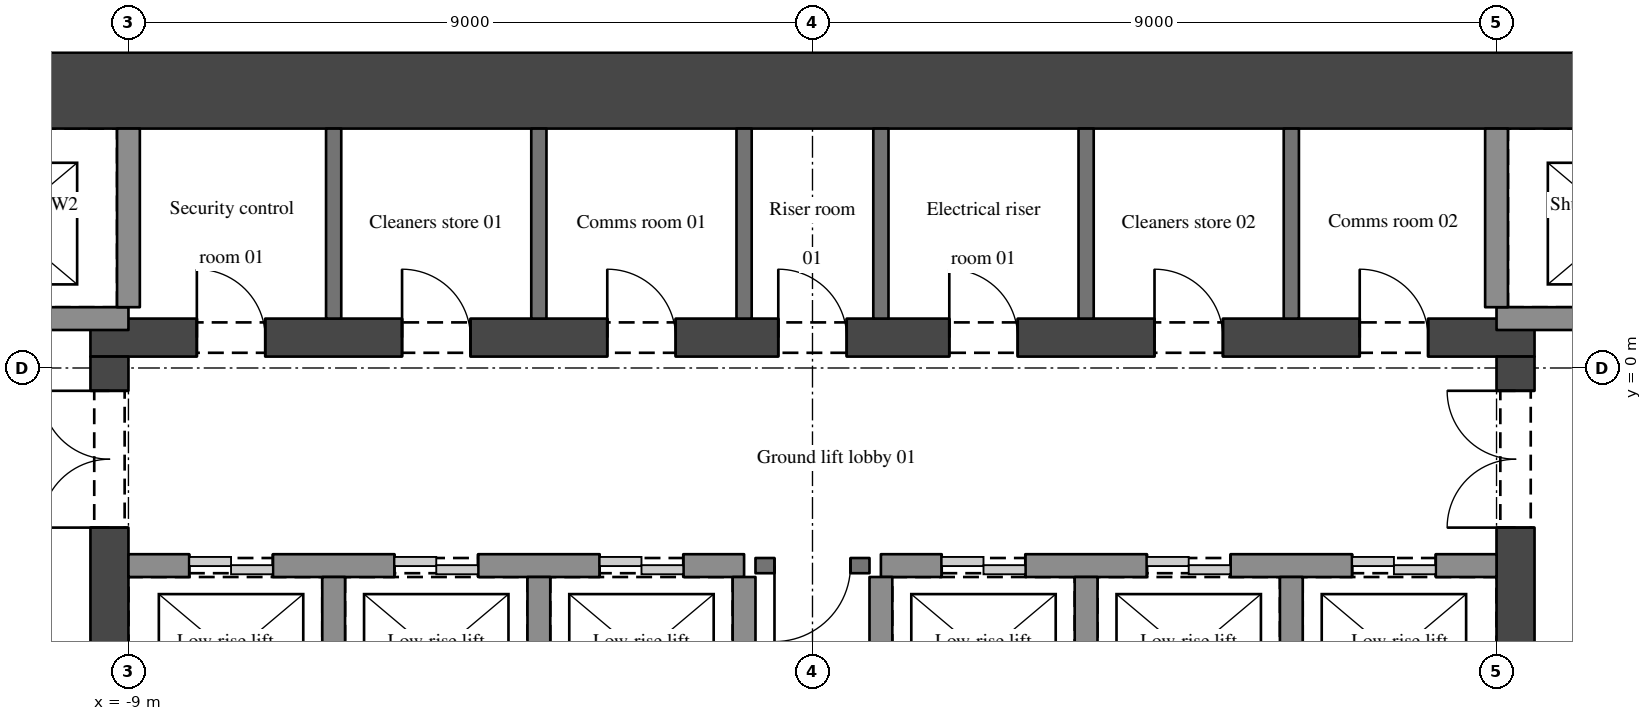
"""IFC4 building model, lengths in metres.
Left out: names, types, materials, properties, quantities, classifications, styles, units other than length and angle.
Written with IfcOpenShell. Run it as: python <this file> out.ifc"""

import sys

from ifc_helpers import new_model, si_unit, direction, frame, frame_2d, origin, place, context, subcontext, project, spatial, rectangle, extrude, element, fill, save


model = new_model("IFC4")
c1 = context("Model", 3, precision=1e-05, world=origin(), true_north=direction((0.0, 1.0)))
c2 = subcontext(c1, "Body", "Model", "MODEL_VIEW")
j1 = project(units=[si_unit("LENGTHUNIT", "METRE"), si_unit("PLANEANGLEUNIT", "RADIAN")], contexts=[c1])
p1 = place(None, origin())
s1 = spatial("IfcSite", under=j1, at=p1, CompositionType="ELEMENT")
p2 = place(p1, origin())
s2 = spatial("IfcBuilding", under=s1, at=p2, CompositionType="ELEMENT")
p3 = place(p2, origin())
s3 = spatial("IfcBuildingStorey", under=s2, at=p3, CompositionType="ELEMENT", Elevation=0.0)
p4 = place(p3, frame((-15.0, 3.65, 0.0), z_axis=(0.0, 0.0, 1.0), x_axis=(1.0, 0.0, 0.0)))
e1 = element("IfcWall", 1, at=p4, inside=s3, PredefinedType="SHEAR", context=c2, shape_type="SweptSolid", body=[
    extrude(rectangle(XDim=30.0, YDim=1.0, at=frame_2d((15.0, 0.0))), origin(), (0.0, 0.0, 1.0), 10.8),
])
p5 = place(p3, frame((-9.5, 0.4, 0.0), z_axis=(0.0, 0.0, 1.0), x_axis=(1.0, 0.0, 0.0)))
e2 = element("IfcWall", 2, at=p5, inside=s3, PredefinedType="SHEAR", context=c2, shape_type="SweptSolid", body=[
    extrude(rectangle(XDim=19.0, YDim=0.5, at=frame_2d((9.5, 0.0))), origin(), (0.0, 0.0, 1.0), 10.8),
])
p6 = place(p5, frame((1.4, 0.0, 0.0)))
e3 = element("IfcOpeningElement", 3, at=p6, cuts=e2, PredefinedType="OPENING", context=c2, shape_type="SweptSolid", body=[
    extrude(rectangle(XDim=0.9, YDim=2.1, at=frame_2d((0.45, 1.05))), frame((0.0, 0.26, 0.0), z_axis=(0.0, -1.0, 0.0), x_axis=(1.0, 0.0, 0.0)), (0.0, 0.0, 1.0), 0.52),
])
p7 = place(p5, frame((4.1, 0.0, 0.0)))
e4 = element("IfcOpeningElement", 4, at=p7, cuts=e2, PredefinedType="OPENING", context=c2, shape_type="SweptSolid", body=[
    extrude(rectangle(XDim=0.9, YDim=2.1, at=frame_2d((0.45, 1.05))), frame((0.0, 0.26, 0.0), z_axis=(0.0, -1.0, 0.0), x_axis=(1.0, 0.0, 0.0)), (0.0, 0.0, 1.0), 0.52),
])
p8 = place(p5, frame((6.8, 0.0, 0.0)))
e5 = element("IfcOpeningElement", 5, at=p8, cuts=e2, PredefinedType="OPENING", context=c2, shape_type="SweptSolid", body=[
    extrude(rectangle(XDim=0.9, YDim=2.1, at=frame_2d((0.45, 1.05))), frame((0.0, 0.26, 0.0), z_axis=(0.0, -1.0, 0.0), x_axis=(1.0, 0.0, 0.0)), (0.0, 0.0, 1.0), 0.52),
])
p9 = place(p5, frame((11.3, 0.0, 0.0)))
e6 = element("IfcOpeningElement", 6, at=p9, cuts=e2, PredefinedType="OPENING", context=c2, shape_type="SweptSolid", body=[
    extrude(rectangle(XDim=0.9, YDim=2.1, at=frame_2d((0.45, 1.05))), frame((0.0, 0.26, 0.0), z_axis=(0.0, -1.0, 0.0), x_axis=(1.0, 0.0, 0.0)), (0.0, 0.0, 1.0), 0.52),
])
p10 = place(p5, frame((14.0, 0.0, 0.0)))
e7 = element("IfcOpeningElement", 7, at=p10, cuts=e2, PredefinedType="OPENING", context=c2, shape_type="SweptSolid", body=[
    extrude(rectangle(XDim=0.9, YDim=2.1, at=frame_2d((0.45, 1.05))), frame((0.0, 0.26, 0.0), z_axis=(0.0, -1.0, 0.0), x_axis=(1.0, 0.0, 0.0)), (0.0, 0.0, 1.0), 0.52),
])
p11 = place(p5, frame((16.7, 0.0, 0.0)))
e8 = element("IfcOpeningElement", 8, at=p11, cuts=e2, PredefinedType="OPENING", context=c2, shape_type="SweptSolid", body=[
    extrude(rectangle(XDim=0.9, YDim=2.1, at=frame_2d((0.45, 1.05))), frame((0.0, 0.26, 0.0), z_axis=(0.0, -1.0, 0.0), x_axis=(1.0, 0.0, 0.0)), (0.0, 0.0, 1.0), 0.52),
])
p12 = place(p5, frame((9.05, 0.0, 0.0)))
e9 = element("IfcOpeningElement", 9, at=p12, cuts=e2, PredefinedType="OPENING", context=c2, shape_type="SweptSolid", body=[
    extrude(rectangle(XDim=0.9, YDim=2.1, at=frame_2d((0.45, 1.05))), frame((0.0, 0.26, 0.0), z_axis=(0.0, -1.0, 0.0), x_axis=(1.0, 0.0, 0.0)), (0.0, 0.0, 1.0), 0.52),
])
p13 = place(p3, frame((-9.25, -11.5, 0.0), z_axis=(0.0, 0.0, 1.0), x_axis=(0.0, 1.0, 0.0)))
e10 = element("IfcWall", 10, at=p13, inside=s3, PredefinedType="SHEAR", context=c2, shape_type="SweptSolid", body=[
    extrude(rectangle(XDim=11.65, YDim=0.5, at=frame_2d((5.825, 0.0))), origin(), (0.0, 0.0, 1.0), 10.8),
])
p14 = place(p13, frame((9.4, 0.0, 0.0)))
e11 = element("IfcOpeningElement", 11, at=p14, cuts=e10, PredefinedType="OPENING", context=c2, shape_type="SweptSolid", body=[
    extrude(rectangle(XDim=1.8, YDim=2.1, at=frame_2d((0.9, 1.05))), frame((0.0, 0.26, 0.0), z_axis=(0.0, -1.0, 0.0), x_axis=(1.0, 0.0, 0.0)), (0.0, 0.0, 1.0), 0.52),
])
p15 = place(p13, frame((5.25, 0.0, 0.0)))
e12 = element("IfcOpeningElement", 12, at=p15, cuts=e10, PredefinedType="OPENING", context=c2, shape_type="SweptSolid", body=[
    extrude(rectangle(XDim=1.1, YDim=2.1, at=frame_2d((0.55, 1.05))), frame((0.0, 0.26, 0.0), z_axis=(0.0, -1.0, 0.0), x_axis=(1.0, 0.0, 0.0)), (0.0, 0.0, 1.0), 0.52),
])
p16 = place(p3, frame((9.25, -11.5, 0.0), z_axis=(0.0, 0.0, 1.0), x_axis=(0.0, 1.0, 0.0)))
e13 = element("IfcWall", 13, at=p16, inside=s3, PredefinedType="SHEAR", context=c2, shape_type="SweptSolid", body=[
    extrude(rectangle(XDim=11.65, YDim=0.5, at=frame_2d((5.825, 0.0))), origin(), (0.0, 0.0, 1.0), 10.8),
])
p17 = place(p16, frame((9.4, 0.0, 0.0)))
e14 = element("IfcOpeningElement", 14, at=p17, cuts=e13, PredefinedType="OPENING", context=c2, shape_type="SweptSolid", body=[
    extrude(rectangle(XDim=1.8, YDim=2.1, at=frame_2d((0.9, 1.05))), frame((0.0, 0.26, 0.0), z_axis=(0.0, -1.0, 0.0), x_axis=(1.0, 0.0, 0.0)), (0.0, 0.0, 1.0), 0.52),
])
p18 = place(p16, frame((5.25, 0.0, 0.0)))
e15 = element("IfcOpeningElement", 15, at=p18, cuts=e13, PredefinedType="OPENING", context=c2, shape_type="SweptSolid", body=[
    extrude(rectangle(XDim=1.1, YDim=2.1, at=frame_2d((0.55, 1.05))), frame((0.0, 0.26, 0.0), z_axis=(0.0, -1.0, 0.0), x_axis=(1.0, 0.0, 0.0)), (0.0, 0.0, 1.0), 0.52),
])
p19 = place(p3, frame((-9.0, -2.6, 0.0), z_axis=(0.0, 0.0, 1.0), x_axis=(1.0, 0.0, 0.0)))
e16 = element("IfcWall", 16, at=p19, inside=s3, PredefinedType="SHEAR", context=c2, shape_type="SweptSolid", body=[
    extrude(rectangle(XDim=8.1, YDim=0.3, at=frame_2d((4.05, 0.0))), origin(), (0.0, 0.0, 1.0), 10.8),
])
p20 = place(p19, frame((0.8, 0.0, 0.0)))
e17 = element("IfcOpeningElement", 17, at=p20, cuts=e16, PredefinedType="OPENING", context=c2, shape_type="SweptSolid", body=[
    extrude(rectangle(XDim=1.1, YDim=2.1, at=frame_2d((0.55, 1.05))), frame((0.0, 0.16, 0.0), z_axis=(0.0, -1.0, 0.0), x_axis=(1.0, 0.0, 0.0)), (0.0, 0.0, 1.0), 0.32),
])
p21 = place(p19, frame((3.5, 0.0, 0.0)))
e18 = element("IfcOpeningElement", 18, at=p21, cuts=e16, PredefinedType="OPENING", context=c2, shape_type="SweptSolid", body=[
    extrude(rectangle(XDim=1.1, YDim=2.1, at=frame_2d((0.55, 1.05))), frame((0.0, 0.16, 0.0), z_axis=(0.0, -1.0, 0.0), x_axis=(1.0, 0.0, 0.0)), (0.0, 0.0, 1.0), 0.32),
])
p22 = place(p19, frame((6.2, 0.0, 0.0)))
e19 = element("IfcOpeningElement", 19, at=p22, cuts=e16, PredefinedType="OPENING", context=c2, shape_type="SweptSolid", body=[
    extrude(rectangle(XDim=1.1, YDim=2.1, at=frame_2d((0.55, 1.05))), frame((0.0, 0.16, 0.0), z_axis=(0.0, -1.0, 0.0), x_axis=(1.0, 0.0, 0.0)), (0.0, 0.0, 1.0), 0.32),
])
p23 = place(p3, frame((0.75, -2.6, 0.0), z_axis=(0.0, 0.0, 1.0), x_axis=(-1.0, 0.0, 0.0)))
e20 = element("IfcWall", 20, at=p23, inside=s3, PredefinedType="SOLIDWALL", context=c2, shape_type="SweptSolid", body=[
    extrude(rectangle(XDim=1.5, YDim=0.2, at=frame_2d((0.75, 0.0))), origin(), (0.0, 0.0, 1.0), 10.5),
])
p24 = place(p23, frame((0.25, 0.0, 0.0)))
e21 = element("IfcOpeningElement", 21, at=p24, cuts=e20, PredefinedType="OPENING", context=c2, shape_type="SweptSolid", body=[
    extrude(rectangle(XDim=1.0, YDim=2.1, at=frame_2d((0.5, 1.05))), frame((0.0, 0.11, 0.0), z_axis=(0.0, -1.0, 0.0), x_axis=(1.0, 0.0, 0.0)), (0.0, 0.0, 1.0), 0.22),
])
p25 = place(p3, frame((0.9, -2.6, 0.0), z_axis=(0.0, 0.0, 1.0), x_axis=(1.0, 0.0, 0.0)))
e22 = element("IfcWall", 22, at=p25, inside=s3, PredefinedType="SHEAR", context=c2, shape_type="SweptSolid", body=[
    extrude(rectangle(XDim=8.1, YDim=0.3, at=frame_2d((4.05, 0.0))), origin(), (0.0, 0.0, 1.0), 10.8),
])
p26 = place(p25, frame((0.8, 0.0, 0.0)))
e23 = element("IfcOpeningElement", 23, at=p26, cuts=e22, PredefinedType="OPENING", context=c2, shape_type="SweptSolid", body=[
    extrude(rectangle(XDim=1.1, YDim=2.1, at=frame_2d((0.55, 1.05))), frame((0.0, 0.16, 0.0), z_axis=(0.0, -1.0, 0.0), x_axis=(1.0, 0.0, 0.0)), (0.0, 0.0, 1.0), 0.32),
])
p27 = place(p25, frame((3.5, 0.0, 0.0)))
e24 = element("IfcOpeningElement", 24, at=p27, cuts=e22, PredefinedType="OPENING", context=c2, shape_type="SweptSolid", body=[
    extrude(rectangle(XDim=1.1, YDim=2.1, at=frame_2d((0.55, 1.05))), frame((0.0, 0.16, 0.0), z_axis=(0.0, -1.0, 0.0), x_axis=(1.0, 0.0, 0.0)), (0.0, 0.0, 1.0), 0.32),
])
p28 = place(p25, frame((6.2, 0.0, 0.0)))
e25 = element("IfcOpeningElement", 25, at=p28, cuts=e22, PredefinedType="OPENING", context=c2, shape_type="SweptSolid", body=[
    extrude(rectangle(XDim=1.1, YDim=2.1, at=frame_2d((0.55, 1.05))), frame((0.0, 0.16, 0.0), z_axis=(0.0, -1.0, 0.0), x_axis=(1.0, 0.0, 0.0)), (0.0, 0.0, 1.0), 0.32),
])
p29 = place(p3, frame((-9.0, 0.65, 0.0), z_axis=(0.0, 0.0, 1.0), x_axis=(-1.0, 0.0, 0.0)))
e26 = element("IfcWall", 26, at=p29, inside=s3, PredefinedType="SHEAR", context=c2, shape_type="SweptSolid", body=[
    extrude(rectangle(XDim=3.25, YDim=0.3, at=frame_2d((1.625, 0.0))), origin(), (0.0, 0.0, 1.0), 10.8),
])
p30 = place(p29, frame((1.05, 0.0, 0.0)))
e27 = element("IfcOpeningElement", 27, at=p30, cuts=e26, PredefinedType="OPENING", context=c2, shape_type="SweptSolid", body=[
    extrude(rectangle(XDim=1.1, YDim=2.1, at=frame_2d((0.55, 1.05))), frame((0.0, 0.16, 0.0), z_axis=(0.0, -1.0, 0.0), x_axis=(1.0, 0.0, 0.0)), (0.0, 0.0, 1.0), 0.32),
])
p31 = place(p3, frame((12.25, 0.65, 0.0), z_axis=(0.0, 0.0, 1.0), x_axis=(-1.0, 0.0, 0.0)))
e28 = element("IfcWall", 28, at=p31, inside=s3, PredefinedType="SHEAR", context=c2, shape_type="SweptSolid", body=[
    extrude(rectangle(XDim=3.25, YDim=0.3, at=frame_2d((1.625, 0.0))), origin(), (0.0, 0.0, 1.0), 10.8),
])
p32 = place(p31, frame((1.1, 0.0, 0.0)))
e29 = element("IfcOpeningElement", 29, at=p32, cuts=e28, PredefinedType="OPENING", context=c2, shape_type="SweptSolid", body=[
    extrude(rectangle(XDim=1.1, YDim=2.1, at=frame_2d((0.55, 1.05))), frame((0.0, 0.16, 0.0), z_axis=(0.0, -1.0, 0.0), x_axis=(1.0, 0.0, 0.0)), (0.0, 0.0, 1.0), 0.32),
])
p33 = place(p3, frame((-9.0, 0.8, 0.0), z_axis=(0.0, 0.0, 1.0), x_axis=(0.0, 1.0, 0.0)))
e30 = element("IfcWall", 30, at=p33, inside=s3, PredefinedType="SHEAR", context=c2, shape_type="SweptSolid", body=[
    extrude(rectangle(XDim=2.35, YDim=0.3, at=frame_2d((1.175, 0.0))), origin(), (0.0, 0.0, 1.0), 10.8),
])
p34 = place(p3, frame((-6.3, -4.8, 0.0), z_axis=(0.0, 0.0, 1.0), x_axis=(0.0, 1.0, 0.0)))
e31 = element("IfcWall", 31, at=p34, inside=s3, PredefinedType="SHEAR", context=c2, shape_type="SweptSolid", body=[
    extrude(rectangle(XDim=2.05, YDim=0.3, at=frame_2d((1.025, 0.0))), origin(), (0.0, 0.0, 1.0), 10.8),
])
p35 = place(p3, frame((-6.3, 0.65, 0.0), z_axis=(0.0, 0.0, 1.0), x_axis=(0.0, 1.0, 0.0)))
e32 = element("IfcWall", 32, at=p35, inside=s3, PredefinedType="SOLIDWALL", context=c2, shape_type="SweptSolid", body=[
    extrude(rectangle(XDim=2.5, YDim=0.2, at=frame_2d((1.25, 0.0))), origin(), (0.0, 0.0, 1.0), 10.5),
])
p36 = place(p3, frame((-3.6, -4.8, 0.0), z_axis=(0.0, 0.0, 1.0), x_axis=(0.0, 1.0, 0.0)))
e33 = element("IfcWall", 33, at=p36, inside=s3, PredefinedType="SHEAR", context=c2, shape_type="SweptSolid", body=[
    extrude(rectangle(XDim=2.05, YDim=0.3, at=frame_2d((1.025, 0.0))), origin(), (0.0, 0.0, 1.0), 10.8),
])
p37 = place(p3, frame((-3.6, 0.65, 0.0), z_axis=(0.0, 0.0, 1.0), x_axis=(0.0, 1.0, 0.0)))
e34 = element("IfcWall", 34, at=p37, inside=s3, PredefinedType="SOLIDWALL", context=c2, shape_type="SweptSolid", body=[
    extrude(rectangle(XDim=2.5, YDim=0.2, at=frame_2d((1.25, 0.0))), origin(), (0.0, 0.0, 1.0), 10.5),
])
p38 = place(p3, frame((-0.9, -4.8, 0.0), z_axis=(0.0, 0.0, 1.0), x_axis=(0.0, 1.0, 0.0)))
e35 = element("IfcWall", 35, at=p38, inside=s3, PredefinedType="SHEAR", context=c2, shape_type="SweptSolid", body=[
    extrude(rectangle(XDim=2.05, YDim=0.3, at=frame_2d((1.025, 0.0))), origin(), (0.0, 0.0, 1.0), 10.8),
])
p39 = place(p3, frame((-0.9, 0.65, 0.0), z_axis=(0.0, 0.0, 1.0), x_axis=(0.0, 1.0, 0.0)))
e36 = element("IfcWall", 36, at=p39, inside=s3, PredefinedType="SOLIDWALL", context=c2, shape_type="SweptSolid", body=[
    extrude(rectangle(XDim=2.5, YDim=0.2, at=frame_2d((1.25, 0.0))), origin(), (0.0, 0.0, 1.0), 10.5),
])
p40 = place(p3, frame((0.9, -4.8, 0.0), z_axis=(0.0, 0.0, 1.0), x_axis=(0.0, 1.0, 0.0)))
e37 = element("IfcWall", 37, at=p40, inside=s3, PredefinedType="SHEAR", context=c2, shape_type="SweptSolid", body=[
    extrude(rectangle(XDim=2.05, YDim=0.3, at=frame_2d((1.025, 0.0))), origin(), (0.0, 0.0, 1.0), 10.8),
])
p41 = place(p3, frame((0.9, 0.65, 0.0), z_axis=(0.0, 0.0, 1.0), x_axis=(0.0, 1.0, 0.0)))
e38 = element("IfcWall", 38, at=p41, inside=s3, PredefinedType="SOLIDWALL", context=c2, shape_type="SweptSolid", body=[
    extrude(rectangle(XDim=2.5, YDim=0.2, at=frame_2d((1.25, 0.0))), origin(), (0.0, 0.0, 1.0), 10.5),
])
p42 = place(p3, frame((3.6, -4.8, 0.0), z_axis=(0.0, 0.0, 1.0), x_axis=(0.0, 1.0, 0.0)))
e39 = element("IfcWall", 39, at=p42, inside=s3, PredefinedType="SHEAR", context=c2, shape_type="SweptSolid", body=[
    extrude(rectangle(XDim=2.05, YDim=0.3, at=frame_2d((1.025, 0.0))), origin(), (0.0, 0.0, 1.0), 10.8),
])
p43 = place(p3, frame((3.6, 0.65, 0.0), z_axis=(0.0, 0.0, 1.0), x_axis=(0.0, 1.0, 0.0)))
e40 = element("IfcWall", 40, at=p43, inside=s3, PredefinedType="SOLIDWALL", context=c2, shape_type="SweptSolid", body=[
    extrude(rectangle(XDim=2.5, YDim=0.2, at=frame_2d((1.25, 0.0))), origin(), (0.0, 0.0, 1.0), 10.5),
])
p44 = place(p3, frame((6.3, -4.8, 0.0), z_axis=(0.0, 0.0, 1.0), x_axis=(0.0, 1.0, 0.0)))
e41 = element("IfcWall", 41, at=p44, inside=s3, PredefinedType="SHEAR", context=c2, shape_type="SweptSolid", body=[
    extrude(rectangle(XDim=2.05, YDim=0.3, at=frame_2d((1.025, 0.0))), origin(), (0.0, 0.0, 1.0), 10.8),
])
p45 = place(p3, frame((6.3, 0.65, 0.0), z_axis=(0.0, 0.0, 1.0), x_axis=(0.0, 1.0, 0.0)))
e42 = element("IfcWall", 42, at=p45, inside=s3, PredefinedType="SOLIDWALL", context=c2, shape_type="SweptSolid", body=[
    extrude(rectangle(XDim=2.5, YDim=0.2, at=frame_2d((1.25, 0.0))), origin(), (0.0, 0.0, 1.0), 10.5),
])
p46 = place(p3, frame((9.0, 0.8, 0.0), z_axis=(0.0, 0.0, 1.0), x_axis=(0.0, 1.0, 0.0)))
e43 = element("IfcWall", 43, at=p46, inside=s3, PredefinedType="SHEAR", context=c2, shape_type="SweptSolid", body=[
    extrude(rectangle(XDim=2.35, YDim=0.3, at=frame_2d((1.175, 0.0))), origin(), (0.0, 0.0, 1.0), 10.8),
])
p47 = place(p17, origin())
e44 = element("IfcDoor", 44, at=p47, inside=s3, OperationType="DOUBLE_DOOR_SINGLE_SWING", PredefinedType="DOOR", context=c2, shape_type="SweptSolid", body=[
    extrude(rectangle(XDim=1.8, YDim=2.1, at=frame_2d((0.9, 1.05))), frame((0.0, 0.025, 0.0), z_axis=(0.0, -1.0, 0.0), x_axis=(1.0, 0.0, 0.0)), (0.0, 0.0, 1.0), 0.05),
])
fill(e14, e44)
p48 = place(p14, origin())
e45 = element("IfcDoor", 45, at=p48, inside=s3, OperationType="DOUBLE_DOOR_SINGLE_SWING", PredefinedType="DOOR", context=c2, shape_type="SweptSolid", body=[
    extrude(rectangle(XDim=1.8, YDim=2.1, at=frame_2d((0.9, 1.05))), frame((0.0, 0.025, 0.0), z_axis=(0.0, -1.0, 0.0), x_axis=(1.0, 0.0, 0.0)), (0.0, 0.0, 1.0), 0.05),
])
fill(e11, e45)
p49 = place(p24, origin())
e46 = element("IfcDoor", 46, at=p49, inside=s3, OperationType="SINGLE_SWING_RIGHT", PredefinedType="DOOR", context=c2, shape_type="SweptSolid", body=[
    extrude(rectangle(XDim=1.0, YDim=2.1, at=frame_2d((0.5, 1.05))), frame((0.0, 0.025, 0.0), z_axis=(0.0, -1.0, 0.0), x_axis=(1.0, 0.0, 0.0)), (0.0, 0.0, 1.0), 0.05),
])
fill(e21, e46)
p50 = place(p6, origin())
e47 = element("IfcDoor", 47, at=p50, inside=s3, OperationType="SINGLE_SWING_LEFT", PredefinedType="DOOR", context=c2, shape_type="SweptSolid", body=[
    extrude(rectangle(XDim=0.9, YDim=2.1, at=frame_2d((0.45, 1.05))), frame((0.0, 0.025, 0.0), z_axis=(0.0, -1.0, 0.0), x_axis=(1.0, 0.0, 0.0)), (0.0, 0.0, 1.0), 0.05),
])
fill(e3, e47)
p51 = place(p7, origin())
e48 = element("IfcDoor", 48, at=p51, inside=s3, OperationType="SINGLE_SWING_LEFT", PredefinedType="DOOR", context=c2, shape_type="SweptSolid", body=[
    extrude(rectangle(XDim=0.9, YDim=2.1, at=frame_2d((0.45, 1.05))), frame((0.0, 0.025, 0.0), z_axis=(0.0, -1.0, 0.0), x_axis=(1.0, 0.0, 0.0)), (0.0, 0.0, 1.0), 0.05),
])
fill(e4, e48)
p52 = place(p8, origin())
e49 = element("IfcDoor", 49, at=p52, inside=s3, OperationType="SINGLE_SWING_LEFT", PredefinedType="DOOR", context=c2, shape_type="SweptSolid", body=[
    extrude(rectangle(XDim=0.9, YDim=2.1, at=frame_2d((0.45, 1.05))), frame((0.0, 0.025, 0.0), z_axis=(0.0, -1.0, 0.0), x_axis=(1.0, 0.0, 0.0)), (0.0, 0.0, 1.0), 0.05),
])
fill(e5, e49)
p53 = place(p9, origin())
e50 = element("IfcDoor", 50, at=p53, inside=s3, OperationType="SINGLE_SWING_LEFT", PredefinedType="DOOR", context=c2, shape_type="SweptSolid", body=[
    extrude(rectangle(XDim=0.9, YDim=2.1, at=frame_2d((0.45, 1.05))), frame((0.0, 0.025, 0.0), z_axis=(0.0, -1.0, 0.0), x_axis=(1.0, 0.0, 0.0)), (0.0, 0.0, 1.0), 0.05),
])
fill(e6, e50)
p54 = place(p10, origin())
e51 = element("IfcDoor", 51, at=p54, inside=s3, OperationType="SINGLE_SWING_LEFT", PredefinedType="DOOR", context=c2, shape_type="SweptSolid", body=[
    extrude(rectangle(XDim=0.9, YDim=2.1, at=frame_2d((0.45, 1.05))), frame((0.0, 0.025, 0.0), z_axis=(0.0, -1.0, 0.0), x_axis=(1.0, 0.0, 0.0)), (0.0, 0.0, 1.0), 0.05),
])
fill(e7, e51)
p55 = place(p11, origin())
e52 = element("IfcDoor", 52, at=p55, inside=s3, OperationType="SINGLE_SWING_LEFT", PredefinedType="DOOR", context=c2, shape_type="SweptSolid", body=[
    extrude(rectangle(XDim=0.9, YDim=2.1, at=frame_2d((0.45, 1.05))), frame((0.0, 0.025, 0.0), z_axis=(0.0, -1.0, 0.0), x_axis=(1.0, 0.0, 0.0)), (0.0, 0.0, 1.0), 0.05),
])
fill(e8, e52)
p56 = place(p12, origin())
e53 = element("IfcDoor", 53, at=p56, inside=s3, OperationType="SINGLE_SWING_LEFT", PredefinedType="DOOR", context=c2, shape_type="SweptSolid", body=[
    extrude(rectangle(XDim=0.9, YDim=2.1, at=frame_2d((0.45, 1.05))), frame((0.0, 0.025, 0.0), z_axis=(0.0, -1.0, 0.0), x_axis=(1.0, 0.0, 0.0)), (0.0, 0.0, 1.0), 0.05),
])
fill(e9, e53)
p57 = place(p20, origin())
e54 = element("IfcDoor", 54, at=p57, inside=s3, OperationType="DOUBLE_DOOR_SLIDING", PredefinedType="DOOR", context=c2, shape_type="SweptSolid", body=[
    extrude(rectangle(XDim=1.1, YDim=2.1, at=frame_2d((0.55, 1.05))), frame((0.0, 0.025, 0.0), z_axis=(0.0, -1.0, 0.0), x_axis=(1.0, 0.0, 0.0)), (0.0, 0.0, 1.0), 0.05),
])
fill(e17, e54)
p58 = place(p21, origin())
e55 = element("IfcDoor", 55, at=p58, inside=s3, OperationType="DOUBLE_DOOR_SLIDING", PredefinedType="DOOR", context=c2, shape_type="SweptSolid", body=[
    extrude(rectangle(XDim=1.1, YDim=2.1, at=frame_2d((0.55, 1.05))), frame((0.0, 0.025, 0.0), z_axis=(0.0, -1.0, 0.0), x_axis=(1.0, 0.0, 0.0)), (0.0, 0.0, 1.0), 0.05),
])
fill(e18, e55)
p59 = place(p22, origin())
e56 = element("IfcDoor", 56, at=p59, inside=s3, OperationType="DOUBLE_DOOR_SLIDING", PredefinedType="DOOR", context=c2, shape_type="SweptSolid", body=[
    extrude(rectangle(XDim=1.1, YDim=2.1, at=frame_2d((0.55, 1.05))), frame((0.0, 0.025, 0.0), z_axis=(0.0, -1.0, 0.0), x_axis=(1.0, 0.0, 0.0)), (0.0, 0.0, 1.0), 0.05),
])
fill(e19, e56)
p60 = place(p26, origin())
e57 = element("IfcDoor", 57, at=p60, inside=s3, OperationType="DOUBLE_DOOR_SLIDING", PredefinedType="DOOR", context=c2, shape_type="SweptSolid", body=[
    extrude(rectangle(XDim=1.1, YDim=2.1, at=frame_2d((0.55, 1.05))), frame((0.0, 0.025, 0.0), z_axis=(0.0, -1.0, 0.0), x_axis=(1.0, 0.0, 0.0)), (0.0, 0.0, 1.0), 0.05),
])
fill(e23, e57)
p61 = place(p27, origin())
e58 = element("IfcDoor", 58, at=p61, inside=s3, OperationType="DOUBLE_DOOR_SLIDING", PredefinedType="DOOR", context=c2, shape_type="SweptSolid", body=[
    extrude(rectangle(XDim=1.1, YDim=2.1, at=frame_2d((0.55, 1.05))), frame((0.0, 0.025, 0.0), z_axis=(0.0, -1.0, 0.0), x_axis=(1.0, 0.0, 0.0)), (0.0, 0.0, 1.0), 0.05),
])
fill(e24, e58)
p62 = place(p28, origin())
e59 = element("IfcDoor", 59, at=p62, inside=s3, OperationType="DOUBLE_DOOR_SLIDING", PredefinedType="DOOR", context=c2, shape_type="SweptSolid", body=[
    extrude(rectangle(XDim=1.1, YDim=2.1, at=frame_2d((0.55, 1.05))), frame((0.0, 0.025, 0.0), z_axis=(0.0, -1.0, 0.0), x_axis=(1.0, 0.0, 0.0)), (0.0, 0.0, 1.0), 0.05),
])
fill(e25, e59)
save(model, sys.argv[1])
